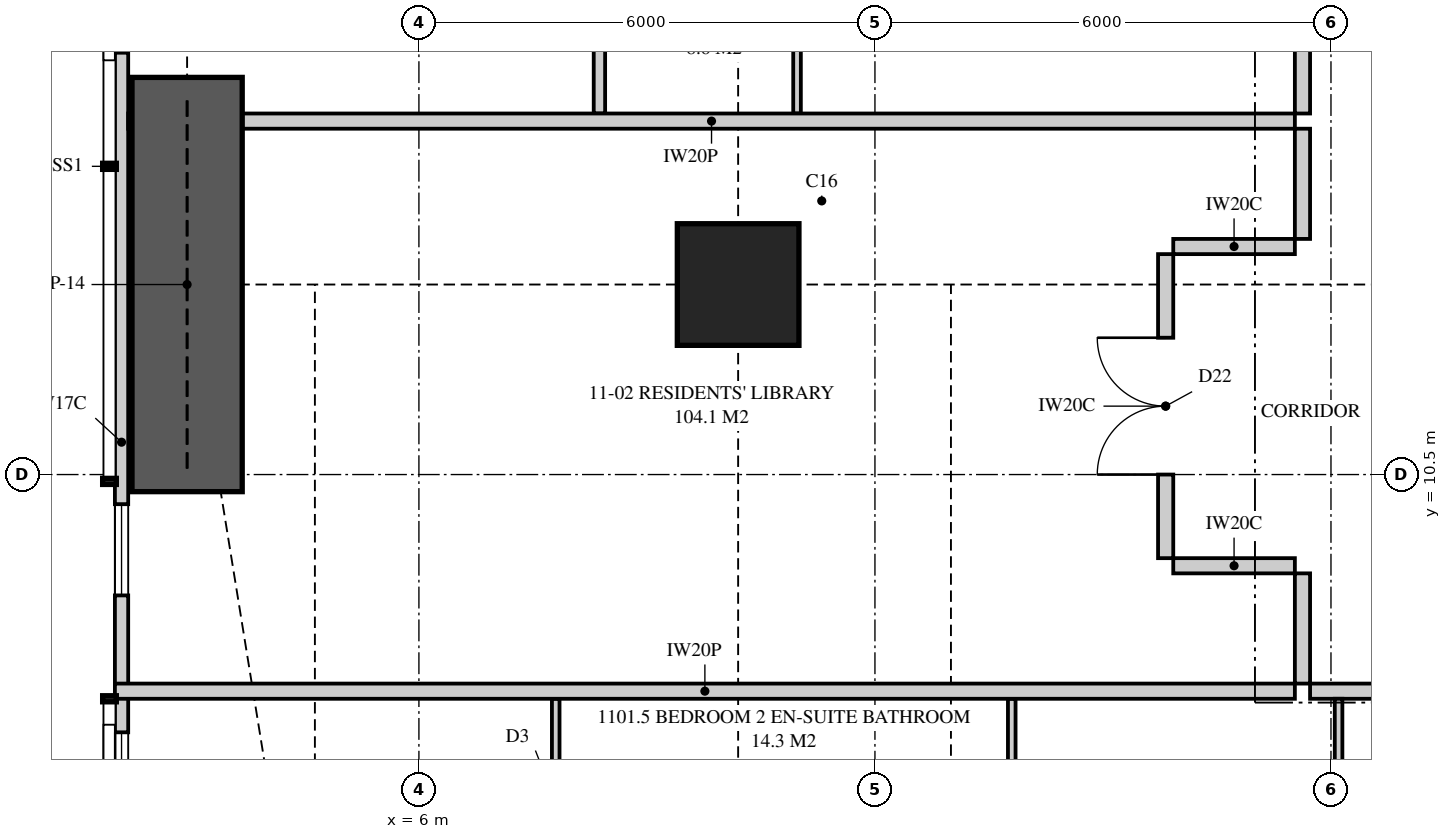
"""IFC4 building model, lengths in metres.
Left out: names, types, materials, properties, quantities, classifications, styles, units other than length and angle.
Written with IfcOpenShell. Run it as: python <this file> out.ifc"""

import sys

from ifc_helpers import new_model, si_unit, direction, frame, frame_2d, origin, origin_2d, place, context, subcontext, project, spatial, polyline, rectangle, outline, extrude, element, fill, save


model = new_model("IFC4")
c1 = context("Model", 3, precision=1e-05, world=origin(), true_north=direction((0.0, 1.0)))
c2 = subcontext(c1, "Body", "Model", "MODEL_VIEW")
j1 = project(units=[si_unit("LENGTHUNIT", "METRE"), si_unit("PLANEANGLEUNIT", "RADIAN")], contexts=[c1])
p1 = place(None, origin())
s1 = spatial("IfcSite", under=j1, at=p1, CompositionType="ELEMENT")
p2 = place(p1, origin())
s2 = spatial("IfcBuilding", under=s1, at=p2, CompositionType="ELEMENT")
p3 = place(p2, frame((0.0, 0.0, 44.45)))
s3 = spatial("IfcBuildingStorey", under=s2, at=p3, CompositionType="ELEMENT", Elevation=44.45)
p4 = place(p3, frame((10.2, 13.0, 0.0), z_axis=(0.0, 0.0, 1.0), x_axis=(1.0, 0.0, 0.0)))
e1 = element("IfcColumn", 1, at=p4, inside=s3, PredefinedType="COLUMN", context=c2, shape_type="SweptSolid", body=[
    extrude(rectangle(XDim=1.6, YDim=1.6, at=origin_2d()), origin(), (0.0, 0.0, 1.0), 3.35),
])
p5 = place(p3, frame((2.087, 18.8, 0.0), z_axis=(0.0, 0.0, 1.0), x_axis=(0.0, -1.0, 0.0)))
e2 = element("IfcWall", 2, at=p5, inside=s3, PredefinedType="SOLIDWALL", context=c2, shape_type="SweptSolid", body=[
    extrude(outline(polyline([(0.0, 0.0), (15.749, 0.0), (15.749, 3.11), (6.019, 3.11), (6.019, 2.15), (5.926, 2.15), (5.926, 3.11), (5.8, 3.11), (5.8, 2.15), (0.0, 2.15), (0.0, 0.0)])), frame((0.0, 0.087, 0.0), z_axis=(0.0, -1.0, 0.0), x_axis=(1.0, 0.0, 0.0)), (0.0, 0.0, 1.0), 0.175),
])
p6 = place(p5, frame((0.95, 0.0, 0.4)))
e3 = element("IfcOpeningElement", 3, at=p6, cuts=e2, PredefinedType="OPENING", context=c2, shape_type="SweptSolid", body=[
    extrude(rectangle(XDim=1.8, YDim=1.7, at=frame_2d((0.9, 0.85))), frame((0.0, 0.097, 0.0), z_axis=(0.0, -1.0, 0.0), x_axis=(1.0, 0.0, 0.0)), (0.0, 0.0, 1.0), 0.195),
])
p7 = place(p5, frame((8.69, 0.0, 0.4)))
e4 = element("IfcOpeningElement", 4, at=p7, cuts=e2, PredefinedType="OPENING", context=c2, shape_type="SweptSolid", body=[
    extrude(rectangle(XDim=1.2, YDim=1.7, at=frame_2d((0.6, 0.85))), frame((0.0, 0.097, 0.0), z_axis=(0.0, -1.0, 0.0), x_axis=(1.0, 0.0, 0.0)), (0.0, 0.0, 1.0), 0.195),
])
p8 = place(p5, frame((11.691, 0.0, 0.4)))
e5 = element("IfcOpeningElement", 5, at=p8, cuts=e2, PredefinedType="OPENING", context=c2, shape_type="SweptSolid", body=[
    extrude(rectangle(XDim=1.8, YDim=1.7, at=frame_2d((0.9, 0.85))), frame((0.0, 0.097, 0.0), z_axis=(0.0, -1.0, 0.0), x_axis=(1.0, 0.0, 0.0)), (0.0, 0.0, 1.0), 0.195),
])
p9 = place(p3, frame((17.725, 7.65, 0.0), z_axis=(0.0, 0.0, 1.0), x_axis=(1.0, 0.0, 0.0)))
e6 = element("IfcWall", 6, at=p9, inside=s3, PredefinedType="PARTITIONING", context=c2, shape_type="SweptSolid", body=[
    extrude(outline(polyline([(0.0, 0.0), (18.375, 0.0), (18.375, 3.11), (17.612, 3.11), (17.612, 2.541), (16.938, 2.541), (16.938, 3.11), (6.612, 3.11), (6.612, 2.541), (5.938, 2.541), (5.938, 3.11), (0.0, 3.11), (0.0, 0.0)])), frame((0.0, 0.1, 0.0), z_axis=(0.0, -1.0, 0.0), x_axis=(1.0, 0.0, 0.0)), (0.0, 0.0, 1.0), 0.2),
])
p10 = place(p9, frame((0.875, 0.0, 0.0)))
e7 = element("IfcOpeningElement", 7, at=p10, cuts=e6, PredefinedType="OPENING", context=c2, shape_type="SweptSolid", body=[
    extrude(rectangle(XDim=1.05, YDim=2.2, at=frame_2d((0.525, 1.1))), frame((0.0, 0.11, 0.0), z_axis=(0.0, -1.0, 0.0), x_axis=(1.0, 0.0, 0.0)), (0.0, 0.0, 1.0), 0.22),
])
p11 = place(p3, frame((7.8, 0.175, 0.0), z_axis=(0.0, 0.0, 1.0), x_axis=(0.0, 1.0, 0.0)))
e8 = element("IfcWall", 8, at=p11, inside=s3, PredefinedType="PARTITIONING", context=c2, shape_type="SweptSolid", body=[
    extrude(outline(polyline([(0.0, 0.0), (7.375, 0.0), (7.375, 3.11), (2.697, 3.11), (2.697, 2.15), (0.943, 2.15), (0.943, 3.11), (0.0, 3.11), (0.0, 0.0)])), frame((0.0, 0.05, 0.0), z_axis=(0.0, -1.0, 0.0), x_axis=(1.0, 0.0, 0.0)), (0.0, 0.0, 1.0), 0.1),
])
p12 = place(p11, frame((2.842, 0.0, 0.0)))
e9 = element("IfcOpeningElement", 9, at=p12, cuts=e8, PredefinedType="OPENING", context=c2, shape_type="SweptSolid", body=[
    extrude(rectangle(XDim=0.9, YDim=2.1, at=frame_2d((0.45, 1.05))), frame((0.0, 0.06, 0.0), z_axis=(0.0, -1.0, 0.0), x_axis=(1.0, 0.0, 0.0)), (0.0, 0.0, 1.0), 0.12),
])
p13 = place(p11, frame((5.559, 0.0, 0.0)))
e10 = element("IfcOpeningElement", 10, at=p13, cuts=e8, PredefinedType="OPENING", context=c2, shape_type="SweptSolid", body=[
    extrude(rectangle(XDim=0.9, YDim=2.1, at=frame_2d((0.45, 1.05))), frame((0.0, 0.06, 0.0), z_axis=(0.0, -1.0, 0.0), x_axis=(1.0, 0.0, 0.0)), (0.0, 0.0, 1.0), 0.12),
])
p14 = place(p3, frame((13.8, 0.175, 0.0), z_axis=(0.0, 0.0, 1.0), x_axis=(0.0, 1.0, 0.0)))
e11 = element("IfcWall", 11, at=p14, inside=s3, PredefinedType="PARTITIONING", context=c2, shape_type="SweptSolid", body=[
    extrude(outline(polyline([(1.635, 2.15), (0.0, 2.15), (0.0, 0.0), (7.375, 0.0), (7.375, 3.11), (1.635, 3.11), (1.635, 2.15)]), holes=[polyline([(1.021, 0.126), (0.529, 0.126), (0.529, 0.919), (1.021, 0.919), (1.021, 0.126)]), polyline([(1.021, 1.231), (0.529, 1.231), (0.529, 2.024), (1.021, 2.024), (1.021, 1.231)])]), frame((0.0, 0.05, 0.0), z_axis=(0.0, -1.0, 0.0), x_axis=(1.0, 0.0, 0.0)), (0.0, 0.0, 1.0), 0.1),
])
p15 = place(p14, frame((3.525, 0.0, 0.0)))
e12 = element("IfcOpeningElement", 12, at=p15, cuts=e11, PredefinedType="OPENING", context=c2, shape_type="SweptSolid", body=[
    extrude(rectangle(XDim=0.9, YDim=2.1, at=frame_2d((0.45, 1.05))), frame((0.0, 0.06, 0.0), z_axis=(0.0, -1.0, 0.0), x_axis=(1.0, 0.0, 0.0)), (0.0, 0.0, 1.0), 0.12),
])
p16 = place(p3, frame((18.1, 0.175, 0.0), z_axis=(0.0, 0.0, 1.0), x_axis=(0.0, 1.0, 0.0)))
e13 = element("IfcWall", 13, at=p16, inside=s3, PredefinedType="PARTITIONING", context=c2, shape_type="SweptSolid", body=[
    extrude(outline(polyline([(0.0, 0.0), (7.375, 0.0), (7.375, 3.11), (1.635, 3.11), (1.635, 2.15), (0.0, 2.15), (0.0, 3.11), (0.0, 0.0)])), frame((0.0, 0.05, 0.0), z_axis=(0.0, -1.0, 0.0), x_axis=(1.0, 0.0, 0.0)), (0.0, 0.0, 1.0), 0.1),
])
p17 = place(p16, frame((3.525, 0.0, 0.0)))
e14 = element("IfcOpeningElement", 14, at=p17, cuts=e13, PredefinedType="OPENING", context=c2, shape_type="SweptSolid", body=[
    extrude(rectangle(XDim=0.9, YDim=2.1, at=frame_2d((0.45, 1.05))), frame((0.0, 0.06, 0.0), z_axis=(0.0, -1.0, 0.0), x_axis=(1.0, 0.0, 0.0)), (0.0, 0.0, 1.0), 0.12),
])
p18 = place(p16, frame((4.95, 0.0, 0.0)))
e15 = element("IfcOpeningElement", 15, at=p18, cuts=e13, PredefinedType="OPENING", context=c2, shape_type="SweptSolid", body=[
    extrude(rectangle(XDim=0.9, YDim=2.1, at=frame_2d((0.45, 1.05))), frame((0.0, 0.06, 0.0), z_axis=(0.0, -1.0, 0.0), x_axis=(1.0, 0.0, 0.0)), (0.0, 0.0, 1.0), 0.12),
])
p19 = place(p3, frame((2.0, 7.65, 0.0), z_axis=(0.0, 0.0, 1.0), x_axis=(1.0, 0.0, 0.0)))
e16 = element("IfcWall", 16, at=p19, inside=s3, PredefinedType="PARTITIONING", context=c2, shape_type="SweptSolid", body=[
    extrude(outline(polyline([(0.0, 0.0), (15.525, 0.0), (15.525, 3.11), (11.337, 3.11), (11.337, 2.541), (10.663, 2.541), (10.663, 3.11), (9.51, 3.11), (9.51, 2.51), (6.89, 2.51), (6.89, 3.11), (2.969, 3.11), (2.969, 2.541), (2.74, 2.541), (2.74, 2.15), (0.896, 2.15), (0.896, 3.11), (0.0, 3.11), (0.0, 0.0)])), frame((0.0, 0.1, 0.0), z_axis=(0.0, -1.0, 0.0), x_axis=(1.0, 0.0, 0.0)), (0.0, 0.0, 1.0), 0.2),
])
p20 = place(p3, frame((2.175, 15.15, 0.0), z_axis=(0.0, 0.0, 1.0), x_axis=(1.0, 0.0, 0.0)))
e17 = element("IfcWall", 17, at=p20, inside=s3, PredefinedType="PARTITIONING", context=c2, shape_type="SweptSolid", body=[
    extrude(outline(polyline([(0.529, 2.15), (0.0, 2.15), (0.0, 0.0), (0.529, 0.0), (0.529, 0.021), (1.021, 0.021), (1.021, 0.0), (15.35, 0.0), (15.35, 3.11), (9.335, 3.11), (9.335, 2.51), (6.715, 2.51), (6.715, 3.11), (1.685, 3.11), (1.685, 2.15), (1.021, 2.15), (1.021, 2.129), (0.529, 2.129), (0.529, 2.15)])), frame((0.0, 0.1, 0.0), z_axis=(0.0, -1.0, 0.0), x_axis=(1.0, 0.0, 0.0)), (0.0, 0.0, 1.0), 0.2),
])
p21 = place(p3, frame((17.625, 7.75, 0.0), z_axis=(0.0, 0.0, 1.0), x_axis=(0.0, 1.0, 0.0)))
e18 = element("IfcWall", 18, at=p21, inside=s3, PredefinedType="PARTITIONING", context=c2, shape_type="SweptSolid", body=[
    extrude(rectangle(XDim=1.45, YDim=0.2, at=frame_2d((0.725, 0.0))), origin(), (0.0, 0.0, 1.0), 3.11),
])
p22 = place(p3, frame((17.625, 15.25, 0.0), z_axis=(0.0, 0.0, 1.0), x_axis=(0.0, 1.0, 0.0)))
e19 = element("IfcWall", 19, at=p22, inside=s3, PredefinedType="PARTITIONING", context=c2, shape_type="SweptSolid", body=[
    extrude(outline(polyline([(0.0, 0.0), (14.0, 0.0), (14.0, 3.11), (10.087, 3.11), (10.087, 2.541), (9.413, 2.541), (9.413, 3.11), (0.0, 3.11), (0.0, 0.0)])), frame((0.0, 0.1, 0.0), z_axis=(0.0, -1.0, 0.0), x_axis=(1.0, 0.0, 0.0)), (0.0, 0.0, 1.0), 0.2),
])
p23 = place(p22, frame((6.5, 0.0, 0.0)))
e20 = element("IfcOpeningElement", 20, at=p23, cuts=e19, PredefinedType="OPENING", context=c2, shape_type="SweptSolid", body=[
    extrude(rectangle(XDim=1.05, YDim=2.2, at=frame_2d((0.525, 1.1))), frame((0.0, 0.11, 0.0), z_axis=(0.0, -1.0, 0.0), x_axis=(1.0, 0.0, 0.0)), (0.0, 0.0, 1.0), 0.22),
])
p24 = place(p3, frame((8.375, 15.25, 0.0), z_axis=(0.0, 0.0, 1.0), x_axis=(0.0, 1.0, 0.0)))
e21 = element("IfcWall", 21, at=p24, inside=s3, PredefinedType="PLUMBINGWALL", context=c2, shape_type="SweptSolid", body=[
    extrude(rectangle(XDim=3.45, YDim=0.15, at=frame_2d((1.725, 0.0))), origin(), (0.0, 0.0, 1.0), 3.11),
])
p25 = place(p24, frame((2.15, 0.0, 0.0)))
e22 = element("IfcOpeningElement", 22, at=p25, cuts=e21, PredefinedType="OPENING", context=c2, shape_type="SweptSolid", body=[
    extrude(rectangle(XDim=0.9, YDim=2.1, at=frame_2d((0.45, 1.05))), frame((0.0, 0.085, 0.0), z_axis=(0.0, -1.0, 0.0), x_axis=(1.0, 0.0, 0.0)), (0.0, 0.0, 1.0), 0.17),
])
p26 = place(p3, frame((10.975, 15.25, 0.0), z_axis=(0.0, 0.0, 1.0), x_axis=(0.0, 1.0, 0.0)))
e23 = element("IfcWall", 23, at=p26, inside=s3, PredefinedType="PARTITIONING", context=c2, shape_type="SweptSolid", body=[
    extrude(outline(polyline([(0.0, 0.0), (3.45, 0.0), (3.45, 3.11), (3.45, 2.51), (0.0, 2.51), (0.0, 3.11), (0.0, 0.0)])), frame((0.0, 0.05, 0.0), z_axis=(0.0, -1.0, 0.0), x_axis=(1.0, 0.0, 0.0)), (0.0, 0.0, 1.0), 0.1),
])
p27 = place(p3, frame((17.625, 13.6, 0.0), z_axis=(0.0, 0.0, 1.0), x_axis=(0.0, 1.0, 0.0)))
e24 = element("IfcWall", 24, at=p27, inside=s3, PredefinedType="PARTITIONING", context=c2, shape_type="SweptSolid", body=[
    extrude(rectangle(XDim=1.45, YDim=0.2, at=frame_2d((0.725, 0.0))), origin(), (0.0, 0.0, 1.0), 3.11),
])
p28 = place(p3, frame((15.825, 9.4, 0.0), z_axis=(0.0, 0.0, 1.0), x_axis=(0.0, 1.0, 0.0)))
e25 = element("IfcWall", 25, at=p28, inside=s3, PredefinedType="PARTITIONING", context=c2, shape_type="SweptSolid", body=[
    extrude(outline(polyline([(0.0, 0.0), (4.0, 0.0), (4.0, 3.11), (3.937, 3.11), (3.937, 2.541), (3.263, 2.541), (3.263, 3.11), (0.0, 3.11), (0.0, 0.0)])), frame((0.0, 0.1, 0.0), z_axis=(0.0, -1.0, 0.0), x_axis=(1.0, 0.0, 0.0)), (0.0, 0.0, 1.0), 0.2),
])
p29 = place(p28, frame((1.1, 0.0, 0.0)))
e26 = element("IfcOpeningElement", 26, at=p29, cuts=e25, PredefinedType="OPENING", context=c2, shape_type="SweptSolid", body=[
    extrude(rectangle(XDim=1.8, YDim=2.1, at=frame_2d((0.9, 1.05))), frame((0.0, 0.11, 0.0), z_axis=(0.0, -1.0, 0.0), x_axis=(1.0, 0.0, 0.0)), (0.0, 0.0, 1.0), 0.22),
])
for number, where, z_axis, x_axis in (
    (27, (17.525, 9.3, 0.0), (0.0, 0.0, 1.0), (-1.0, 0.0, 0.0)),
    (28, (17.525, 13.5, 0.0), (0.0, 0.0, 1.0), (-1.0, 0.0, 0.0)),
):
    element("IfcWall", number, at=place(p3, frame(where, z_axis=z_axis, x_axis=x_axis)), inside=s3, PredefinedType="PARTITIONING", context=c2, shape_type="SweptSolid", body=[
        extrude(rectangle(XDim=1.6, YDim=0.2, at=frame_2d((0.8, 0.0))), origin(), (0.0, 0.0, 1.0), 3.11),
    ])
p30 = place(p3, frame((2.95, 10.275, 0.0), z_axis=(0.0, 0.0, 1.0), x_axis=(0.0, 1.0, 0.0)))
e29 = element("IfcWall", 29, at=p30, inside=s3, PredefinedType="SHEAR", context=c2, shape_type="SweptSolid", body=[
    extrude(rectangle(XDim=5.45, YDim=1.45, at=frame_2d((2.725, 0.0))), origin(), (0.0, 0.0, 1.0), 3.35),
])
p31 = place(p7, origin())
e30 = element("IfcWindow", 30, at=p31, inside=s3, PartitioningType="SINGLE_PANEL", PredefinedType="WINDOW", context=c2, shape_type="SweptSolid", body=[
    extrude(rectangle(XDim=1.2, YDim=1.7, at=frame_2d((0.6, 0.85))), frame((0.0, 0.03, 0.0), z_axis=(0.0, -1.0, 0.0), x_axis=(1.0, 0.0, 0.0)), (0.0, 0.0, 1.0), 0.06),
])
fill(e4, e30)
p32 = place(p8, origin())
e31 = element("IfcWindow", 31, at=p32, inside=s3, PartitioningType="SINGLE_PANEL", PredefinedType="WINDOW", context=c2, shape_type="SweptSolid", body=[
    extrude(rectangle(XDim=1.8, YDim=1.7, at=frame_2d((0.9, 0.85))), frame((0.0, 0.03, 0.0), z_axis=(0.0, -1.0, 0.0), x_axis=(1.0, 0.0, 0.0)), (0.0, 0.0, 1.0), 0.06),
])
fill(e5, e31)
p33 = place(p29, origin())
e32 = element("IfcDoor", 32, at=p33, inside=s3, OperationType="DOUBLE_DOOR_SINGLE_SWING", PredefinedType="DOOR", context=c2, shape_type="SweptSolid", body=[
    extrude(rectangle(XDim=1.8, YDim=2.1, at=frame_2d((0.9, 1.05))), frame((0.0, 0.025, 0.0), z_axis=(0.0, -1.0, 0.0), x_axis=(1.0, 0.0, 0.0)), (0.0, 0.0, 1.0), 0.05),
])
fill(e26, e32)
save(model, sys.argv[1])
